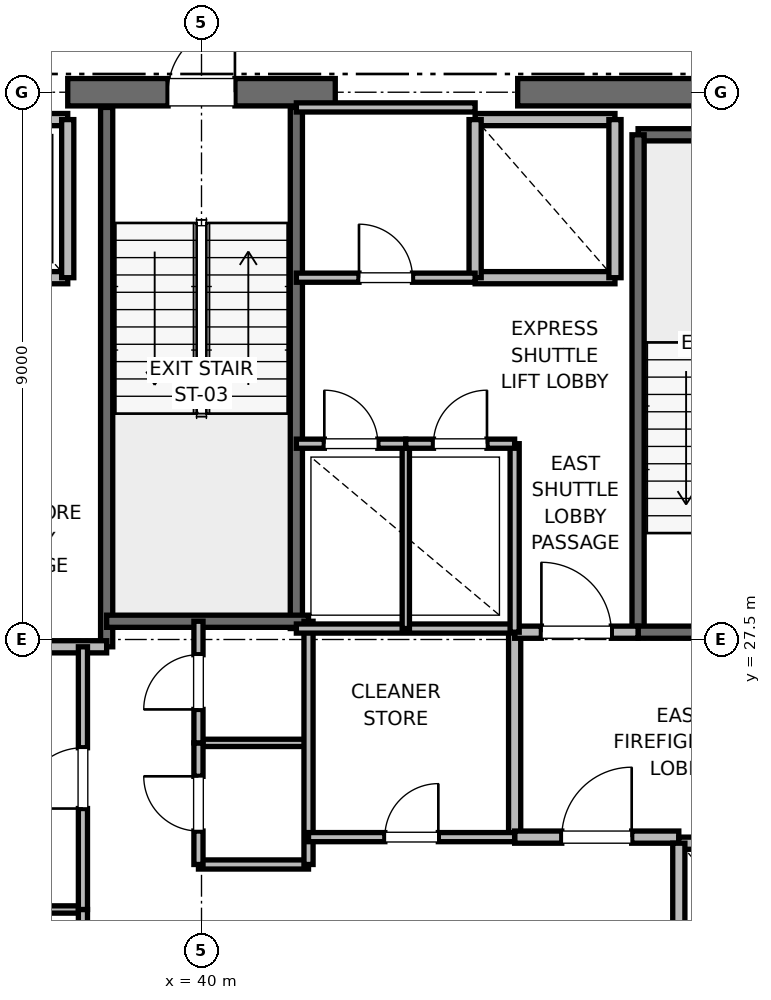
"""IFC4 building model, lengths in metres.
Left out: names, types, materials, properties, quantities, classifications, styles, units other than length and angle.
Written with IfcOpenShell. Run it as: python <this file> out.ifc"""

import sys

from ifc_helpers import new_model, si_unit, direction, frame, frame_2d, origin, place, context, subcontext, project, spatial, rectangle, extrude, element, fill, save


model = new_model("IFC4")
c1 = context("Model", 3, precision=1e-05, world=origin(), true_north=direction((0.0, 1.0)))
c2 = subcontext(c1, "Body", "Model", "MODEL_VIEW")
j1 = project(units=[si_unit("LENGTHUNIT", "METRE"), si_unit("PLANEANGLEUNIT", "RADIAN")], contexts=[c1])
p1 = place(None, origin())
s1 = spatial("IfcSite", under=j1, at=p1, CompositionType="ELEMENT")
p2 = place(p1, origin())
s2 = spatial("IfcBuilding", under=s1, at=p2, CompositionType="ELEMENT")
p3 = place(p2, frame((0.0, 0.0, 243.2)))
s3 = spatial("IfcBuildingStorey", under=s2, at=p3, CompositionType="ELEMENT", Elevation=243.2)
p4 = place(p3, frame((37.8, 36.5, 0.0), z_axis=(0.0, 0.0, 1.0), x_axis=(1.0, 0.0, 0.0)))
e1 = element("IfcWall", 1, at=p4, inside=s3, PredefinedType="SHEAR", context=c2, shape_type="SweptSolid", body=[
    extrude(rectangle(XDim=4.4, YDim=0.45, at=frame_2d((2.2, 0.0))), origin(), (0.0, 0.0, 1.0), 3.785),
])
p5 = place(p4, frame((1.65, 0.0, 0.0)))
e2 = element("IfcOpeningElement", 2, at=p5, cuts=e1, PredefinedType="OPENING", context=c2, shape_type="SweptSolid", body=[
    extrude(rectangle(XDim=1.1, YDim=2.15, at=frame_2d((0.55, 1.075))), frame((0.0, 0.225, 0.0), z_axis=(0.0, -1.0, 0.0), x_axis=(1.0, 0.0, 0.0)), (0.0, 0.0, 1.0), 0.45),
])
p6 = place(p3, frame((45.2, 36.5, 0.0), z_axis=(0.0, 0.0, 1.0), x_axis=(1.0, 0.0, 0.0)))
e3 = element("IfcWall", 3, at=p6, inside=s3, PredefinedType="SHEAR", context=c2, shape_type="SweptSolid", body=[
    extrude(rectangle(XDim=5.8, YDim=0.45, at=frame_2d((2.9, 0.0))), origin(), (0.0, 0.0, 1.0), 3.785),
])
p7 = place(p3, frame((47.18, 35.8, 0.0), z_axis=(0.0, 0.0, 1.0), x_axis=(1.0, 0.0, 0.0)))
e4 = element("IfcWall", 4, at=p7, inside=s3, PredefinedType="SOLIDWALL", context=c2, shape_type="SweptSolid", body=[
    extrude(rectangle(XDim=3.12, YDim=0.2, at=frame_2d((1.56, 0.0))), origin(), (0.0, 0.0, 1.0), 3.785),
])
p8 = place(p3, frame((47.18, 27.62, 0.0), z_axis=(0.0, 0.0, 1.0), x_axis=(0.0, 1.0, 0.0)))
e5 = element("IfcWall", 5, at=p8, inside=s3, PredefinedType="SOLIDWALL", context=c2, shape_type="SweptSolid", body=[
    extrude(rectangle(XDim=8.18, YDim=0.2, at=frame_2d((4.09, 0.0))), origin(), (0.0, 0.0, 1.0), 3.785),
])
p9 = place(p3, frame((47.18, 27.62, 0.0), z_axis=(0.0, 0.0, 1.0), x_axis=(1.0, 0.0, 0.0)))
e6 = element("IfcWall", 6, at=p9, inside=s3, PredefinedType="SOLIDWALL", context=c2, shape_type="SweptSolid", body=[
    extrude(rectangle(XDim=3.12, YDim=0.2, at=frame_2d((1.56, 0.0))), origin(), (0.0, 0.0, 1.0), 3.785),
])
p10 = place(p9, frame((1.01, 0.0, 0.0)))
e7 = element("IfcOpeningElement", 7, at=p10, cuts=e6, PredefinedType="OPENING", context=c2, shape_type="SweptSolid", body=[
    extrude(rectangle(XDim=1.1, YDim=2.15, at=frame_2d((0.55, 1.075))), frame((0.0, 0.1, 0.0), z_axis=(0.0, -1.0, 0.0), x_axis=(1.0, 0.0, 0.0)), (0.0, 0.0, 1.0), 0.2),
])
p11 = place(p3, frame((38.44, 27.38, 0.0), z_axis=(0.0, 0.0, 1.0), x_axis=(0.0, 1.0, 0.0)))
e8 = element("IfcWall", 8, at=p11, inside=s3, PredefinedType="SOLIDWALL", context=c2, shape_type="SweptSolid", body=[
    extrude(rectangle(XDim=8.87, YDim=0.2, at=frame_2d((4.435, 0.0))), origin(), (0.0, 0.0, 1.0), 3.785),
])
p12 = place(p3, frame((41.56, 27.68, 0.0), z_axis=(0.0, 0.0, 1.0), x_axis=(0.0, 1.0, 0.0)))
e9 = element("IfcWall", 9, at=p12, inside=s3, PredefinedType="SOLIDWALL", context=c2, shape_type="SweptSolid", body=[
    extrude(rectangle(XDim=8.57, YDim=0.2, at=frame_2d((4.285, 0.0))), origin(), (0.0, 0.0, 1.0), 3.785),
])
p13 = place(p3, frame((38.44, 27.8, 0.0), z_axis=(0.0, 0.0, 1.0), x_axis=(1.0, 0.0, 0.0)))
e10 = element("IfcWall", 10, at=p13, inside=s3, PredefinedType="SOLIDWALL", context=c2, shape_type="SweptSolid", body=[
    extrude(rectangle(XDim=3.32, YDim=0.2, at=frame_2d((1.66, 0.0))), origin(), (0.0, 0.0, 1.0), 3.785),
])
p14 = place(p3, frame((32.82, 27.38, 0.0), z_axis=(0.0, 0.0, 1.0), x_axis=(1.0, 0.0, 0.0)))
e11 = element("IfcWall", 11, at=p14, inside=s3, PredefinedType="PARTITIONING", context=c2, shape_type="SweptSolid", body=[
    extrude(rectangle(XDim=5.62, YDim=0.2, at=frame_2d((2.81, 0.0))), origin(), (0.0, 0.0, 1.0), 3.785),
])
p15 = place(p3, frame((45.15, 24.25, 0.0), z_axis=(0.0, 0.0, 1.0), x_axis=(0.0, 1.0, 0.0)))
e12 = element("IfcWall", 12, at=p15, inside=s3, PredefinedType="PARTITIONING", context=c2, shape_type="SweptSolid", body=[
    extrude(rectangle(XDim=3.37, YDim=0.2, at=frame_2d((1.685, 0.0))), origin(), (0.0, 0.0, 1.0), 3.785),
])
p16 = place(p3, frame((45.15, 24.25, 0.0), z_axis=(0.0, 0.0, 1.0), x_axis=(1.0, 0.0, 0.0)))
e13 = element("IfcWall", 13, at=p16, inside=s3, PredefinedType="PARTITIONING", context=c2, shape_type="SweptSolid", body=[
    extrude(rectangle(XDim=2.7, YDim=0.2, at=frame_2d((1.35, 0.0))), origin(), (0.0, 0.0, 1.0), 3.785),
])
p17 = place(p16, frame((0.775, 0.0, 0.0)))
e14 = element("IfcOpeningElement", 14, at=p17, cuts=e13, PredefinedType="OPENING", context=c2, shape_type="SweptSolid", body=[
    extrude(rectangle(XDim=1.15, YDim=2.2, at=frame_2d((0.575, 1.1))), frame((0.0, 0.1, 0.0), z_axis=(0.0, -1.0, 0.0), x_axis=(1.0, 0.0, 0.0)), (0.0, 0.0, 1.0), 0.2),
])
p18 = place(p3, frame((45.15, 27.62, 0.0), z_axis=(0.0, 0.0, 1.0), x_axis=(1.0, 0.0, 0.0)))
e15 = element("IfcWall", 15, at=p18, inside=s3, PredefinedType="PARTITIONING", context=c2, shape_type="SweptSolid", body=[
    extrude(rectangle(XDim=2.03, YDim=0.2, at=frame_2d((1.015, 0.0))), origin(), (0.0, 0.0, 1.0), 3.785),
])
p19 = place(p18, frame((0.44, 0.0, 0.0)))
e16 = element("IfcOpeningElement", 16, at=p19, cuts=e15, PredefinedType="OPENING", context=c2, shape_type="SweptSolid", body=[
    extrude(rectangle(XDim=1.15, YDim=2.2, at=frame_2d((0.575, 1.1))), frame((0.0, 0.1, 0.0), z_axis=(0.0, -1.0, 0.0), x_axis=(1.0, 0.0, 0.0)), (0.0, 0.0, 1.0), 0.2),
])
p20 = place(p3, frame((50.45, 24.15, 0.0), z_axis=(0.0, 0.0, 1.0), x_axis=(-1.0, 0.0, 0.0)))
e17 = element("IfcWall", 17, at=p20, inside=s3, PredefinedType="SOLIDWALL", context=c2, shape_type="SweptSolid", body=[
    extrude(rectangle(XDim=2.6, YDim=0.2, at=frame_2d((1.3, 0.0))), origin(), (0.0, 0.0, 1.0), 2.865),
])
p21 = place(p20, frame((0.75, 0.0, 0.0)))
e18 = element("IfcOpeningElement", 18, at=p21, cuts=e17, PredefinedType="OPENING", context=c2, shape_type="SweptSolid", body=[
    extrude(rectangle(XDim=1.1, YDim=2.2, at=frame_2d((0.55, 1.1))), frame((0.0, 0.1, 0.0), z_axis=(0.0, -1.0, 0.0), x_axis=(1.0, 0.0, 0.0)), (0.0, 0.0, 1.0), 0.2),
])
p22 = place(p3, frame((47.85, 24.15, 0.0), z_axis=(0.0, 0.0, 1.0), x_axis=(0.0, -1.0, 0.0)))
e19 = element("IfcWall", 19, at=p22, inside=s3, PredefinedType="SOLIDWALL", context=c2, shape_type="SweptSolid", body=[
    extrude(rectangle(XDim=3.0, YDim=0.2, at=frame_2d((1.5, 0.0))), origin(), (0.0, 0.0, 1.0), 3.785),
])
p23 = place(p3, frame((35.5, 33.45, 0.0), z_axis=(0.0, 0.0, 1.0), x_axis=(1.0, 0.0, 0.0)))
e20 = element("IfcWall", 20, at=p23, inside=s3, PredefinedType="SOLIDWALL", context=c2, shape_type="SweptSolid", body=[
    extrude(rectangle(XDim=2.3, YDim=0.2, at=frame_2d((1.15, 0.0))), origin(), (0.0, 0.0, 1.0), 3.785),
])
p24 = place(p23, frame((0.6, 0.0, 0.0)))
e21 = element("IfcOpeningElement", 21, at=p24, cuts=e20, PredefinedType="OPENING", context=c2, shape_type="SweptSolid", body=[
    extrude(rectangle(XDim=1.1, YDim=2.2, at=frame_2d((0.55, 1.1))), frame((0.0, 0.1, 0.0), z_axis=(0.0, -1.0, 0.0), x_axis=(1.0, 0.0, 0.0)), (0.0, 0.0, 1.0), 0.2),
])
p25 = place(p3, frame((37.8, 36.05, 0.0), z_axis=(0.0, 0.0, 1.0), x_axis=(-1.0, 0.0, 0.0)))
e22 = element("IfcWall", 22, at=p25, inside=s3, PredefinedType="SOLIDWALL", context=c2, shape_type="SweptSolid", body=[
    extrude(rectangle(XDim=2.3, YDim=0.2, at=frame_2d((1.15, 0.0))), origin(), (0.0, 0.0, 1.0), 2.865),
])
p26 = place(p3, frame((37.8, 33.45, 0.0), z_axis=(0.0, 0.0, 1.0), x_axis=(0.0, 1.0, 0.0)))
e23 = element("IfcWall", 23, at=p26, inside=s3, PredefinedType="SOLIDWALL", context=c2, shape_type="SweptSolid", body=[
    extrude(rectangle(XDim=2.6, YDim=0.2, at=frame_2d((1.3, 0.0))), origin(), (0.0, 0.0, 1.0), 2.865),
])
p27 = place(p3, frame((44.5, 33.45, 0.0), z_axis=(0.0, 0.0, 1.0), x_axis=(1.0, 0.0, 0.0)))
e24 = element("IfcWall", 24, at=p27, inside=s3, PredefinedType="SOLIDWALL", context=c2, shape_type="SweptSolid", body=[
    extrude(rectangle(XDim=2.3, YDim=0.2, at=frame_2d((1.15, 0.0))), origin(), (0.0, 0.0, 1.0), 3.785),
])
p28 = place(p3, frame((46.8, 36.05, 0.0), z_axis=(0.0, 0.0, 1.0), x_axis=(-1.0, 0.0, 0.0)))
e25 = element("IfcWall", 25, at=p28, inside=s3, PredefinedType="SOLIDWALL", context=c2, shape_type="SweptSolid", body=[
    extrude(rectangle(XDim=2.3, YDim=0.2, at=frame_2d((1.15, 0.0))), origin(), (0.0, 0.0, 1.0), 2.865),
])
p29 = place(p3, frame((44.5, 36.05, 0.0), z_axis=(0.0, 0.0, 1.0), x_axis=(0.0, -1.0, 0.0)))
e26 = element("IfcWall", 26, at=p29, inside=s3, PredefinedType="SOLIDWALL", context=c2, shape_type="SweptSolid", body=[
    extrude(rectangle(XDim=2.6, YDim=0.2, at=frame_2d((1.3, 0.0))), origin(), (0.0, 0.0, 1.0), 2.865),
])
p30 = place(p3, frame((46.8, 33.45, 0.0), z_axis=(0.0, 0.0, 1.0), x_axis=(0.0, 1.0, 0.0)))
e27 = element("IfcWall", 27, at=p30, inside=s3, PredefinedType="SOLIDWALL", context=c2, shape_type="SweptSolid", body=[
    extrude(rectangle(XDim=2.6, YDim=0.2, at=frame_2d((1.3, 0.0))), origin(), (0.0, 0.0, 1.0), 3.785),
])
p31 = place(p3, frame((39.95, 23.8, 0.0), z_axis=(0.0, 0.0, 1.0), x_axis=(1.0, 0.0, 0.0)))
e28 = element("IfcWall", 28, at=p31, inside=s3, PredefinedType="PARTITIONING", context=c2, shape_type="SweptSolid", body=[
    extrude(rectangle(XDim=1.81, YDim=0.15, at=frame_2d((0.905, 0.0))), origin(), (0.0, 0.0, 1.0), 2.85),
])
p32 = place(p3, frame((39.95, 25.8, 0.0), z_axis=(0.0, 0.0, 1.0), x_axis=(1.0, 0.0, 0.0)))
e29 = element("IfcWall", 29, at=p32, inside=s3, PredefinedType="PARTITIONING", context=c2, shape_type="SweptSolid", body=[
    extrude(rectangle(XDim=1.81, YDim=0.12, at=frame_2d((0.905, 0.0))), origin(), (0.0, 0.0, 1.0), 2.85),
])
p33 = place(p3, frame((41.76, 23.8, 0.0), z_axis=(0.0, 0.0, 1.0), x_axis=(0.0, 1.0, 0.0)))
e30 = element("IfcWall", 30, at=p33, inside=s3, PredefinedType="PARTITIONING", context=c2, shape_type="SweptSolid", body=[
    extrude(rectangle(XDim=4.0, YDim=0.15, at=frame_2d((2.0, 0.0))), origin(), (0.0, 0.0, 1.0), 2.85),
])
p34 = place(p3, frame((39.95, 23.8, 0.0), z_axis=(0.0, 0.0, 1.0), x_axis=(0.0, 1.0, 0.0)))
e31 = element("IfcWall", 31, at=p34, inside=s3, PredefinedType="PARTITIONING", context=c2, shape_type="SweptSolid", body=[
    extrude(rectangle(XDim=2.0, YDim=0.15, at=frame_2d((1.0, 0.0))), origin(), (0.0, 0.0, 1.0), 2.85),
])
p35 = place(p34, frame((0.55, 0.0, 0.0)))
e32 = element("IfcOpeningElement", 32, at=p35, cuts=e31, PredefinedType="OPENING", context=c2, shape_type="SweptSolid", body=[
    extrude(rectangle(XDim=0.9, YDim=2.1, at=frame_2d((0.45, 1.05))), frame((0.0, 0.075, 0.0), z_axis=(0.0, -1.0, 0.0), x_axis=(1.0, 0.0, 0.0)), (0.0, 0.0, 1.0), 0.15),
])
p36 = place(p3, frame((39.95, 25.8, 0.0), z_axis=(0.0, 0.0, 1.0), x_axis=(0.0, 1.0, 0.0)))
e33 = element("IfcWall", 33, at=p36, inside=s3, PredefinedType="PARTITIONING", context=c2, shape_type="SweptSolid", body=[
    extrude(rectangle(XDim=2.0, YDim=0.15, at=frame_2d((1.0, 0.0))), origin(), (0.0, 0.0, 1.0), 2.85),
])
p37 = place(p36, frame((0.55, 0.0, 0.0)))
e34 = element("IfcOpeningElement", 34, at=p37, cuts=e33, PredefinedType="OPENING", context=c2, shape_type="SweptSolid", body=[
    extrude(rectangle(XDim=0.9, YDim=2.1, at=frame_2d((0.45, 1.05))), frame((0.0, 0.075, 0.0), z_axis=(0.0, -1.0, 0.0), x_axis=(1.0, 0.0, 0.0)), (0.0, 0.0, 1.0), 0.15),
])
p38 = place(p3, frame((32.82, 23.06, 0.0), z_axis=(0.0, 0.0, 1.0), x_axis=(1.0, 0.0, 0.0)))
e35 = element("IfcWall", 35, at=p38, inside=s3, PredefinedType="PARTITIONING", context=c2, shape_type="SweptSolid", body=[
    extrude(rectangle(XDim=5.23, YDim=0.12, at=frame_2d((2.615, 0.0))), origin(), (0.0, 0.0, 1.0), 2.85),
])
p39 = place(p3, frame((38.05, 18.6, 0.0), z_axis=(0.0, 0.0, 1.0), x_axis=(0.0, 1.0, 0.0)))
e36 = element("IfcWall", 36, at=p39, inside=s3, PredefinedType="PARTITIONING", context=c2, shape_type="SweptSolid", body=[
    extrude(rectangle(XDim=4.46, YDim=0.15, at=frame_2d((2.23, 0.0))), origin(), (0.0, 0.0, 1.0), 2.85),
])
p40 = place(p39, frame((1.73, 0.0, 0.0)))
e37 = element("IfcOpeningElement", 37, at=p40, cuts=e36, PredefinedType="OPENING", context=c2, shape_type="SweptSolid", body=[
    extrude(rectangle(XDim=1.0, YDim=2.15, at=frame_2d((0.5, 1.075))), frame((0.0, 0.075, 0.0), z_axis=(0.0, -1.0, 0.0), x_axis=(1.0, 0.0, 0.0)), (0.0, 0.0, 1.0), 0.15),
])
p41 = place(p3, frame((38.05, 23.06, 0.0), z_axis=(0.0, 0.0, 1.0), x_axis=(0.0, 1.0, 0.0)))
e38 = element("IfcWall", 38, at=p41, inside=s3, PredefinedType="PARTITIONING", context=c2, shape_type="SweptSolid", body=[
    extrude(rectangle(XDim=4.32, YDim=0.15, at=frame_2d((2.16, 0.0))), origin(), (0.0, 0.0, 1.0), 2.85),
])
p42 = place(p41, frame((1.66, 0.0, 0.0)))
e39 = element("IfcOpeningElement", 39, at=p42, cuts=e38, PredefinedType="OPENING", context=c2, shape_type="SweptSolid", body=[
    extrude(rectangle(XDim=1.0, YDim=2.15, at=frame_2d((0.5, 1.075))), frame((0.0, 0.075, 0.0), z_axis=(0.0, -1.0, 0.0), x_axis=(1.0, 0.0, 0.0)), (0.0, 0.0, 1.0), 0.15),
])
p43 = place(p3, frame((41.56, 27.68, 0.0), z_axis=(0.0, 0.0, 1.0), x_axis=(1.0, 0.0, 0.0)))
e40 = element("IfcWall", 40, at=p43, inside=s3, PredefinedType="PARTITIONING", context=c2, shape_type="SweptSolid", body=[
    extrude(rectangle(XDim=3.59, YDim=0.15, at=frame_2d((1.795, 0.0))), origin(), (0.0, 0.0, 1.0), 2.85),
])
p44 = place(p3, frame((41.76, 24.25, 0.0), z_axis=(0.0, 0.0, 1.0), x_axis=(1.0, 0.0, 0.0)))
e41 = element("IfcWall", 41, at=p44, inside=s3, PredefinedType="PARTITIONING", context=c2, shape_type="SweptSolid", body=[
    extrude(rectangle(XDim=3.39, YDim=0.15, at=frame_2d((1.695, 0.0))), origin(), (0.0, 0.0, 1.0), 2.85),
])
p45 = place(p44, frame((1.255, 0.0, 0.0)))
e42 = element("IfcOpeningElement", 42, at=p45, cuts=e41, PredefinedType="OPENING", context=c2, shape_type="SweptSolid", body=[
    extrude(rectangle(XDim=0.88, YDim=2.1, at=frame_2d((0.44, 1.05))), frame((0.0, 0.075, 0.0), z_axis=(0.0, -1.0, 0.0), x_axis=(1.0, 0.0, 0.0)), (0.0, 0.0, 1.0), 0.15),
])
p46 = place(p3, frame((45.15, 27.62, 0.0), z_axis=(0.0, 0.0, 1.0), x_axis=(0.0, 1.0, 0.0)))
e43 = element("IfcWall", 43, at=p46, inside=s3, PredefinedType="PARTITIONING", context=c2, shape_type="SweptSolid", body=[
    extrude(rectangle(XDim=3.1, YDim=0.15, at=frame_2d((1.55, 0.0))), origin(), (0.0, 0.0, 1.0), 2.85),
])
p47 = place(p3, frame((43.36, 27.68, 0.0), z_axis=(0.0, 0.0, 1.0), x_axis=(0.0, 1.0, 0.0)))
e44 = element("IfcWall", 44, at=p47, inside=s3, PredefinedType="PARTITIONING", context=c2, shape_type="SweptSolid", body=[
    extrude(rectangle(XDim=3.04, YDim=0.12, at=frame_2d((1.52, 0.0))), origin(), (0.0, 0.0, 1.0), 2.85),
])
p48 = place(p3, frame((41.56, 30.72, 0.0), z_axis=(0.0, 0.0, 1.0), x_axis=(1.0, 0.0, 0.0)))
e45 = element("IfcWall", 45, at=p48, inside=s3, PredefinedType="PARTITIONING", context=c2, shape_type="SweptSolid", body=[
    extrude(rectangle(XDim=1.8, YDim=0.15, at=frame_2d((0.9, 0.0))), origin(), (0.0, 0.0, 1.0), 2.85),
])
p49 = place(p48, frame((0.46, 0.0, 0.0)))
e46 = element("IfcOpeningElement", 46, at=p49, cuts=e45, PredefinedType="OPENING", context=c2, shape_type="SweptSolid", body=[
    extrude(rectangle(XDim=0.88, YDim=2.1, at=frame_2d((0.44, 1.05))), frame((0.0, 0.075, 0.0), z_axis=(0.0, -1.0, 0.0), x_axis=(1.0, 0.0, 0.0)), (0.0, 0.0, 1.0), 0.15),
])
p50 = place(p3, frame((43.36, 30.72, 0.0), z_axis=(0.0, 0.0, 1.0), x_axis=(1.0, 0.0, 0.0)))
e47 = element("IfcWall", 47, at=p50, inside=s3, PredefinedType="PARTITIONING", context=c2, shape_type="SweptSolid", body=[
    extrude(rectangle(XDim=1.79, YDim=0.15, at=frame_2d((0.895, 0.0))), origin(), (0.0, 0.0, 1.0), 2.85),
])
p51 = place(p50, frame((0.455, 0.0, 0.0)))
e48 = element("IfcOpeningElement", 48, at=p51, cuts=e47, PredefinedType="OPENING", context=c2, shape_type="SweptSolid", body=[
    extrude(rectangle(XDim=0.88, YDim=2.1, at=frame_2d((0.44, 1.05))), frame((0.0, 0.075, 0.0), z_axis=(0.0, -1.0, 0.0), x_axis=(1.0, 0.0, 0.0)), (0.0, 0.0, 1.0), 0.15),
])
p52 = place(p3, frame((41.56, 36.25, 0.0), z_axis=(0.0, 0.0, 1.0), x_axis=(1.0, 0.0, 0.0)))
e49 = element("IfcWall", 49, at=p52, inside=s3, PredefinedType="PARTITIONING", context=c2, shape_type="SweptSolid", body=[
    extrude(rectangle(XDim=2.94, YDim=0.15, at=frame_2d((1.47, 0.0))), origin(), (0.0, 0.0, 1.0), 2.85),
])
p53 = place(p3, frame((41.56, 33.45, 0.0), z_axis=(0.0, 0.0, 1.0), x_axis=(1.0, 0.0, 0.0)))
e50 = element("IfcWall", 50, at=p53, inside=s3, PredefinedType="PARTITIONING", context=c2, shape_type="SweptSolid", body=[
    extrude(rectangle(XDim=2.94, YDim=0.15, at=frame_2d((1.47, 0.0))), origin(), (0.0, 0.0, 1.0), 2.85),
])
p54 = place(p53, frame((1.03, 0.0, 0.0)))
e51 = element("IfcOpeningElement", 51, at=p54, cuts=e50, PredefinedType="OPENING", context=c2, shape_type="SweptSolid", body=[
    extrude(rectangle(XDim=0.88, YDim=2.1, at=frame_2d((0.44, 1.05))), frame((0.0, 0.075, 0.0), z_axis=(0.0, -1.0, 0.0), x_axis=(1.0, 0.0, 0.0)), (0.0, 0.0, 1.0), 0.15),
])
p55 = place(p5, origin())
e52 = element("IfcDoor", 52, at=p55, inside=s3, OperationType="SINGLE_SWING_RIGHT", PredefinedType="DOOR", context=c2, shape_type="SweptSolid", body=[
    extrude(rectangle(XDim=1.1, YDim=2.15, at=frame_2d((0.55, 1.075))), frame((0.0, 0.025, 0.0), z_axis=(0.0, -1.0, 0.0), x_axis=(1.0, 0.0, 0.0)), (0.0, 0.0, 1.0), 0.05),
])
fill(e2, e52)
p56 = place(p17, origin())
e53 = element("IfcDoor", 53, at=p56, inside=s3, OperationType="SINGLE_SWING_RIGHT", PredefinedType="DOOR", context=c2, shape_type="SweptSolid", body=[
    extrude(rectangle(XDim=1.15, YDim=2.2, at=frame_2d((0.575, 1.1))), frame((0.0, 0.025, 0.0), z_axis=(0.0, -1.0, 0.0), x_axis=(1.0, 0.0, 0.0)), (0.0, 0.0, 1.0), 0.05),
])
fill(e14, e53)
p57 = place(p19, origin())
e54 = element("IfcDoor", 54, at=p57, inside=s3, OperationType="SINGLE_SWING_LEFT", PredefinedType="DOOR", context=c2, shape_type="SweptSolid", body=[
    extrude(rectangle(XDim=1.15, YDim=2.2, at=frame_2d((0.575, 1.1))), frame((0.0, 0.025, 0.0), z_axis=(0.0, -1.0, 0.0), x_axis=(1.0, 0.0, 0.0)), (0.0, 0.0, 1.0), 0.05),
])
fill(e16, e54)
p58 = place(p35, origin())
e55 = element("IfcDoor", 55, at=p58, inside=s3, OperationType="SINGLE_SWING_RIGHT", PredefinedType="DOOR", context=c2, shape_type="SweptSolid", body=[
    extrude(rectangle(XDim=0.9, YDim=2.1, at=frame_2d((0.45, 1.05))), frame((0.0, 0.025, 0.0), z_axis=(0.0, -1.0, 0.0), x_axis=(1.0, 0.0, 0.0)), (0.0, 0.0, 1.0), 0.05),
])
fill(e32, e55)
p59 = place(p37, origin())
e56 = element("IfcDoor", 56, at=p59, inside=s3, OperationType="SINGLE_SWING_LEFT", PredefinedType="DOOR", context=c2, shape_type="SweptSolid", body=[
    extrude(rectangle(XDim=0.9, YDim=2.1, at=frame_2d((0.45, 1.05))), frame((0.0, 0.025, 0.0), z_axis=(0.0, -1.0, 0.0), x_axis=(1.0, 0.0, 0.0)), (0.0, 0.0, 1.0), 0.05),
])
fill(e34, e56)
p60 = place(p42, origin())
e57 = element("IfcDoor", 57, at=p60, inside=s3, OperationType="SINGLE_SWING_LEFT", PredefinedType="DOOR", context=c2, shape_type="SweptSolid", body=[
    extrude(rectangle(XDim=1.0, YDim=2.15, at=frame_2d((0.5, 1.075))), frame((0.0, 0.025, 0.0), z_axis=(0.0, -1.0, 0.0), x_axis=(1.0, 0.0, 0.0)), (0.0, 0.0, 1.0), 0.05),
])
fill(e39, e57)
p61 = place(p45, origin())
e58 = element("IfcDoor", 58, at=p61, inside=s3, OperationType="SINGLE_SWING_RIGHT", PredefinedType="DOOR", context=c2, shape_type="SweptSolid", body=[
    extrude(rectangle(XDim=0.88, YDim=2.1, at=frame_2d((0.44, 1.05))), frame((0.0, 0.025, 0.0), z_axis=(0.0, -1.0, 0.0), x_axis=(1.0, 0.0, 0.0)), (0.0, 0.0, 1.0), 0.05),
])
fill(e42, e58)
p62 = place(p49, origin())
e59 = element("IfcDoor", 59, at=p62, inside=s3, OperationType="SINGLE_SWING_LEFT", PredefinedType="DOOR", context=c2, shape_type="SweptSolid", body=[
    extrude(rectangle(XDim=0.88, YDim=2.1, at=frame_2d((0.44, 1.05))), frame((0.0, 0.025, 0.0), z_axis=(0.0, -1.0, 0.0), x_axis=(1.0, 0.0, 0.0)), (0.0, 0.0, 1.0), 0.05),
])
fill(e46, e59)
p63 = place(p51, origin())
e60 = element("IfcDoor", 60, at=p63, inside=s3, OperationType="SINGLE_SWING_RIGHT", PredefinedType="DOOR", context=c2, shape_type="SweptSolid", body=[
    extrude(rectangle(XDim=0.88, YDim=2.1, at=frame_2d((0.44, 1.05))), frame((0.0, 0.025, 0.0), z_axis=(0.0, -1.0, 0.0), x_axis=(1.0, 0.0, 0.0)), (0.0, 0.0, 1.0), 0.05),
])
fill(e48, e60)
p64 = place(p54, origin())
e61 = element("IfcDoor", 61, at=p64, inside=s3, OperationType="SINGLE_SWING_LEFT", PredefinedType="DOOR", context=c2, shape_type="SweptSolid", body=[
    extrude(rectangle(XDim=0.88, YDim=2.1, at=frame_2d((0.44, 1.05))), frame((0.0, 0.025, 0.0), z_axis=(0.0, -1.0, 0.0), x_axis=(1.0, 0.0, 0.0)), (0.0, 0.0, 1.0), 0.05),
])
fill(e51, e61)
save(model, sys.argv[1])
